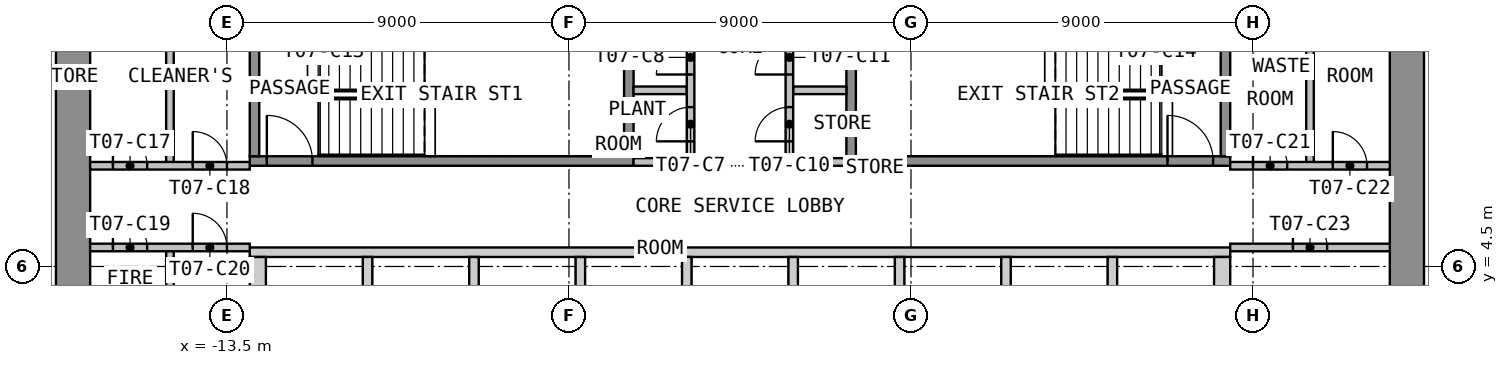
"""IFC4 building model, lengths in metres.
Left out: names, types, materials, properties, quantities, classifications, styles, units other than length and angle.
Written with IfcOpenShell. Run it as: python <this file> out.ifc"""

import sys

from ifc_helpers import new_model, si_unit, direction, frame, frame_2d, origin, place, context, subcontext, project, spatial, polyline, rectangle, outline, extrude, element, fill, save


model = new_model("IFC4")
c1 = context("Model", 3, precision=1e-05, world=origin(), true_north=direction((0.0, 1.0)))
c2 = subcontext(c1, "Body", "Model", "MODEL_VIEW")
j1 = project(units=[si_unit("LENGTHUNIT", "METRE"), si_unit("PLANEANGLEUNIT", "RADIAN")], contexts=[c1])
p1 = place(None, origin())
s1 = spatial("IfcSite", under=j1, at=p1, CompositionType="ELEMENT")
p2 = place(p1, origin())
s2 = spatial("IfcBuilding", under=s1, at=p2, CompositionType="ELEMENT")
p3 = place(p2, frame((0.0, 0.0, 104.7)))
s3 = spatial("IfcBuildingStorey", under=s2, at=p3, CompositionType="ELEMENT", Elevation=104.7)
p4 = place(p3, frame((-17.55, -12.6, 0.0), z_axis=(0.0, 0.0, 1.0), x_axis=(0.0, 1.0, 0.0)))
e1 = element("IfcWall", 1, at=p4, inside=s3, PredefinedType="SHEAR", context=c2, shape_type="SweptSolid", body=[
    extrude(rectangle(XDim=25.2, YDim=0.9, at=frame_2d((12.6, 0.0))), origin(), (0.0, 0.0, 1.0), 3.525),
])
p5 = place(p4, frame((11.4, 0.0, 0.0)))
e2 = element("IfcOpeningElement", 2, at=p5, cuts=e1, PredefinedType="OPENING", context=c2, shape_type="SweptSolid", body=[
    extrude(rectangle(XDim=2.4, YDim=2.1, at=frame_2d((1.2, 1.05))), frame((0.0, 0.46, 0.0), z_axis=(0.0, -1.0, 0.0), x_axis=(1.0, 0.0, 0.0)), (0.0, 0.0, 1.0), 0.92),
])
p6 = place(p3, frame((17.55, -12.6, 0.0), z_axis=(0.0, 0.0, 1.0), x_axis=(0.0, 1.0, 0.0)))
e3 = element("IfcWall", 3, at=p6, inside=s3, PredefinedType="SHEAR", context=c2, shape_type="SweptSolid", body=[
    extrude(rectangle(XDim=25.2, YDim=0.9, at=frame_2d((12.6, 0.0))), origin(), (0.0, 0.0, 1.0), 3.525),
])
p7 = place(p6, frame((11.4, 0.0, 0.0)))
e4 = element("IfcOpeningElement", 4, at=p7, cuts=e3, PredefinedType="OPENING", context=c2, shape_type="SweptSolid", body=[
    extrude(rectangle(XDim=2.4, YDim=2.1, at=frame_2d((1.2, 1.05))), frame((0.0, 0.46, 0.0), z_axis=(0.0, -1.0, 0.0), x_axis=(1.0, 0.0, 0.0)), (0.0, 0.0, 1.0), 0.92),
])
p8 = place(p3, origin())
e5 = element("IfcWall", 5, at=p8, inside=s3, PredefinedType="SHEAR", context=c2, shape_type="SweptSolid", body=[
    extrude(outline(polyline([(-12.9, 4.75), (12.9, 4.75), (12.9, 5.0), (-12.9, 5.0), (-12.9, 4.75)])), origin(), (0.0, 0.0, 1.0), 3.525),
])
p9 = place(p3, origin())
e6 = element("IfcWall", 6, at=p9, inside=s3, PredefinedType="SHEAR", context=c2, shape_type="SweptSolid", body=[
    extrude(outline(polyline([(-12.9, 2.05), (-12.475, 2.05), (-12.475, 4.75), (-12.9, 4.75), (-12.9, 2.05)])), origin(), (0.0, 0.0, 1.0), 3.525),
])
p10 = place(p3, origin())
e7 = element("IfcWall", 7, at=p10, inside=s3, PredefinedType="SHEAR", context=c2, shape_type="SweptSolid", body=[
    extrude(outline(polyline([(-9.925, 2.05), (-9.675, 2.05), (-9.675, 4.75), (-9.925, 4.75), (-9.925, 2.05)])), origin(), (0.0, 0.0, 1.0), 3.525),
])
p11 = place(p3, origin())
e8 = element("IfcWall", 8, at=p11, inside=s3, PredefinedType="SHEAR", context=c2, shape_type="SweptSolid", body=[
    extrude(outline(polyline([(-7.125, 2.05), (-6.875, 2.05), (-6.875, 4.75), (-7.125, 4.75), (-7.125, 2.05)])), origin(), (0.0, 0.0, 1.0), 3.525),
])
p12 = place(p3, origin())
e9 = element("IfcWall", 9, at=p12, inside=s3, PredefinedType="SHEAR", context=c2, shape_type="SweptSolid", body=[
    extrude(outline(polyline([(-4.325, 2.05), (-4.075, 2.05), (-4.075, 4.75), (-4.325, 4.75), (-4.325, 2.05)])), origin(), (0.0, 0.0, 1.0), 3.525),
])
p13 = place(p3, origin())
e10 = element("IfcWall", 10, at=p13, inside=s3, PredefinedType="SHEAR", context=c2, shape_type="SweptSolid", body=[
    extrude(outline(polyline([(-1.525, 2.05), (-1.275, 2.05), (-1.275, 4.75), (-1.525, 4.75), (-1.525, 2.05)])), origin(), (0.0, 0.0, 1.0), 3.525),
])
p14 = place(p3, origin())
e11 = element("IfcWall", 11, at=p14, inside=s3, PredefinedType="SHEAR", context=c2, shape_type="SweptSolid", body=[
    extrude(outline(polyline([(1.275, 2.05), (1.525, 2.05), (1.525, 4.75), (1.275, 4.75), (1.275, 2.05)])), origin(), (0.0, 0.0, 1.0), 3.525),
])
p15 = place(p3, origin())
e12 = element("IfcWall", 12, at=p15, inside=s3, PredefinedType="SHEAR", context=c2, shape_type="SweptSolid", body=[
    extrude(outline(polyline([(4.075, 2.05), (4.325, 2.05), (4.325, 4.75), (4.075, 4.75), (4.075, 2.05)])), origin(), (0.0, 0.0, 1.0), 3.525),
])
p16 = place(p3, origin())
e13 = element("IfcWall", 13, at=p16, inside=s3, PredefinedType="SHEAR", context=c2, shape_type="SweptSolid", body=[
    extrude(outline(polyline([(6.875, 2.05), (7.125, 2.05), (7.125, 4.75), (6.875, 4.75), (6.875, 2.05)])), origin(), (0.0, 0.0, 1.0), 3.525),
])
p17 = place(p3, origin())
e14 = element("IfcWall", 14, at=p17, inside=s3, PredefinedType="SHEAR", context=c2, shape_type="SweptSolid", body=[
    extrude(outline(polyline([(9.675, 2.05), (9.925, 2.05), (9.925, 4.75), (9.675, 4.75), (9.675, 2.05)])), origin(), (0.0, 0.0, 1.0), 3.525),
])
p18 = place(p3, origin())
e15 = element("IfcWall", 15, at=p18, inside=s3, PredefinedType="SHEAR", context=c2, shape_type="SweptSolid", body=[
    extrude(outline(polyline([(12.475, 2.05), (12.9, 2.05), (12.9, 4.75), (12.475, 4.75), (12.475, 2.05)])), origin(), (0.0, 0.0, 1.0), 3.525),
])
p19 = place(p3, frame((-12.9, 7.275, 0.0), z_axis=(0.0, 0.0, 1.0), x_axis=(1.0, 0.0, 0.0)))
e16 = element("IfcWall", 16, at=p19, inside=s3, PredefinedType="SHEAR", context=c2, shape_type="SweptSolid", body=[
    extrude(rectangle(XDim=10.1, YDim=0.25, at=frame_2d((5.05, 0.0))), origin(), (0.0, 0.0, 1.0), 3.525),
])
p20 = place(p19, frame((0.45, 0.0, 0.0)))
e17 = element("IfcOpeningElement", 17, at=p20, cuts=e16, PredefinedType="OPENING", context=c2, shape_type="SweptSolid", body=[
    extrude(rectangle(XDim=1.2, YDim=2.1, at=frame_2d((0.6, 1.05))), frame((0.0, 0.135, 0.0), z_axis=(0.0, -1.0, 0.0), x_axis=(1.0, 0.0, 0.0)), (0.0, 0.0, 1.0), 0.27),
])
for number, where, z_axis, x_axis in (
    (18, (-12.775, 7.4, 0.0), (0.0, 0.0, 1.0), (0.0, 1.0, 0.0)),
    (19, (-2.925, 7.4, 0.0), (0.0, 0.0, 1.0), (0.0, 1.0, 0.0)),
):
    element("IfcWall", number, at=place(p3, frame(where, z_axis=z_axis, x_axis=x_axis)), inside=s3, PredefinedType="SHEAR", context=c2, shape_type="SweptSolid", body=[
        extrude(rectangle(XDim=3.25, YDim=0.25, at=frame_2d((1.625, 0.0))), origin(), (0.0, 0.0, 1.0), 3.525),
    ])
p21 = place(p3, frame((2.8, 7.275, 0.0), z_axis=(0.0, 0.0, 1.0), x_axis=(1.0, 0.0, 0.0)))
e20 = element("IfcWall", 20, at=p21, inside=s3, PredefinedType="SHEAR", context=c2, shape_type="SweptSolid", body=[
    extrude(rectangle(XDim=10.1, YDim=0.25, at=frame_2d((5.05, 0.0))), origin(), (0.0, 0.0, 1.0), 3.525),
])
p22 = place(p21, frame((8.45, 0.0, 0.0)))
e21 = element("IfcOpeningElement", 21, at=p22, cuts=e20, PredefinedType="OPENING", context=c2, shape_type="SweptSolid", body=[
    extrude(rectangle(XDim=1.2, YDim=2.1, at=frame_2d((0.6, 1.05))), frame((0.0, 0.135, 0.0), z_axis=(0.0, -1.0, 0.0), x_axis=(1.0, 0.0, 0.0)), (0.0, 0.0, 1.0), 0.27),
])
for number, where, z_axis, x_axis in (
    (22, (2.925, 7.4, 0.0), (0.0, 0.0, 1.0), (0.0, 1.0, 0.0)),
    (23, (12.775, 7.4, 0.0), (0.0, 0.0, 1.0), (0.0, 1.0, 0.0)),
):
    element("IfcWall", number, at=place(p3, frame(where, z_axis=z_axis, x_axis=x_axis)), inside=s3, PredefinedType="SHEAR", context=c2, shape_type="SweptSolid", body=[
        extrude(rectangle(XDim=3.25, YDim=0.25, at=frame_2d((1.625, 0.0))), origin(), (0.0, 0.0, 1.0), 3.525),
    ])
for number, where, z_axis, x_axis in (
    (24, (-2.8, 7.25, 0.0), (0.0, 0.0, 1.0), (1.0, 0.0, 0.0)),
    (25, (-2.8, 9.135, 0.0), (0.0, 0.0, 1.0), (1.0, 0.0, 0.0)),
    (26, (1.4, 7.25, 0.0), (0.0, 0.0, 1.0), (1.0, 0.0, 0.0)),
    (27, (1.4, 9.135, 0.0), (0.0, 0.0, 1.0), (1.0, 0.0, 0.0)),
):
    element("IfcWall", number, at=place(p3, frame(where, z_axis=z_axis, x_axis=x_axis)), inside=s3, PredefinedType="PARTITIONING", context=c2, shape_type="SweptSolid", body=[
        extrude(rectangle(XDim=1.4, YDim=0.2, at=frame_2d((0.7, 0.0))), origin(), (0.0, 0.0, 1.0), 3.525),
    ])
p23 = place(p3, frame((-1.3, 7.15, 0.0), z_axis=(0.0, 0.0, 1.0), x_axis=(0.0, 1.0, 0.0)))
e28 = element("IfcWall", 28, at=p23, inside=s3, PredefinedType="PARTITIONING", context=c2, shape_type="SweptSolid", body=[
    extrude(rectangle(XDim=5.45, YDim=0.2, at=frame_2d((2.725, 0.0))), origin(), (0.0, 0.0, 1.0), 3.525),
])
p24 = place(p23, frame((0.643, 0.0, 0.0)))
e29 = element("IfcOpeningElement", 29, at=p24, cuts=e28, PredefinedType="OPENING", context=c2, shape_type="SweptSolid", body=[
    extrude(rectangle(XDim=0.9, YDim=2.1, at=frame_2d((0.45, 1.05))), frame((0.0, 0.11, 0.0), z_axis=(0.0, -1.0, 0.0), x_axis=(1.0, 0.0, 0.0)), (0.0, 0.0, 1.0), 0.22),
])
p25 = place(p23, frame((2.401, 0.0, 0.0)))
e30 = element("IfcOpeningElement", 30, at=p25, cuts=e28, PredefinedType="OPENING", context=c2, shape_type="SweptSolid", body=[
    extrude(rectangle(XDim=0.9, YDim=2.1, at=frame_2d((0.45, 1.05))), frame((0.0, 0.11, 0.0), z_axis=(0.0, -1.0, 0.0), x_axis=(1.0, 0.0, 0.0)), (0.0, 0.0, 1.0), 0.22),
])
p26 = place(p23, frame((4.134, 0.0, 0.0)))
e31 = element("IfcOpeningElement", 31, at=p26, cuts=e28, PredefinedType="OPENING", context=c2, shape_type="SweptSolid", body=[
    extrude(rectangle(XDim=0.9, YDim=2.1, at=frame_2d((0.45, 1.05))), frame((0.0, 0.11, 0.0), z_axis=(0.0, -1.0, 0.0), x_axis=(1.0, 0.0, 0.0)), (0.0, 0.0, 1.0), 0.22),
])
p27 = place(p3, frame((1.3, 7.15, 0.0), z_axis=(0.0, 0.0, 1.0), x_axis=(0.0, 1.0, 0.0)))
e32 = element("IfcWall", 32, at=p27, inside=s3, PredefinedType="PARTITIONING", context=c2, shape_type="SweptSolid", body=[
    extrude(rectangle(XDim=5.45, YDim=0.2, at=frame_2d((2.725, 0.0))), origin(), (0.0, 0.0, 1.0), 3.525),
])
p28 = place(p27, frame((0.643, 0.0, 0.0)))
e33 = element("IfcOpeningElement", 33, at=p28, cuts=e32, PredefinedType="OPENING", context=c2, shape_type="SweptSolid", body=[
    extrude(rectangle(XDim=0.9, YDim=2.1, at=frame_2d((0.45, 1.05))), frame((0.0, 0.11, 0.0), z_axis=(0.0, -1.0, 0.0), x_axis=(1.0, 0.0, 0.0)), (0.0, 0.0, 1.0), 0.22),
])
p29 = place(p27, frame((2.401, 0.0, 0.0)))
e34 = element("IfcOpeningElement", 34, at=p29, cuts=e32, PredefinedType="OPENING", context=c2, shape_type="SweptSolid", body=[
    extrude(rectangle(XDim=0.9, YDim=2.1, at=frame_2d((0.45, 1.05))), frame((0.0, 0.11, 0.0), z_axis=(0.0, -1.0, 0.0), x_axis=(1.0, 0.0, 0.0)), (0.0, 0.0, 1.0), 0.22),
])
p30 = place(p27, frame((4.134, 0.0, 0.0)))
e35 = element("IfcOpeningElement", 35, at=p30, cuts=e32, PredefinedType="OPENING", context=c2, shape_type="SweptSolid", body=[
    extrude(rectangle(XDim=0.9, YDim=2.1, at=frame_2d((0.45, 1.05))), frame((0.0, 0.11, 0.0), z_axis=(0.0, -1.0, 0.0), x_axis=(1.0, 0.0, 0.0)), (0.0, 0.0, 1.0), 0.22),
])
p31 = place(p3, frame((-15.0, 7.15, 0.0), z_axis=(0.0, 0.0, 1.0), x_axis=(0.0, 1.0, 0.0)))
e36 = element("IfcWall", 36, at=p31, inside=s3, PredefinedType="PARTITIONING", context=c2, shape_type="SweptSolid", body=[
    extrude(rectangle(XDim=5.45, YDim=0.2, at=frame_2d((2.725, 0.0))), origin(), (0.0, 0.0, 1.0), 3.525),
])
p32 = place(p3, frame((-17.1, 7.15, 0.0), z_axis=(0.0, 0.0, 1.0), x_axis=(1.0, 0.0, 0.0)))
e37 = element("IfcWall", 37, at=p32, inside=s3, PredefinedType="PARTITIONING", context=c2, shape_type="SweptSolid", body=[
    extrude(rectangle(XDim=4.2, YDim=0.2, at=frame_2d((2.1, 0.0))), origin(), (0.0, 0.0, 1.0), 3.525),
])
p33 = place(p32, frame((0.6, 0.0, 0.0)))
e38 = element("IfcOpeningElement", 38, at=p33, cuts=e37, PredefinedType="OPENING", context=c2, shape_type="SweptSolid", body=[
    extrude(rectangle(XDim=0.9, YDim=2.1, at=frame_2d((0.45, 1.05))), frame((0.0, 0.11, 0.0), z_axis=(0.0, -1.0, 0.0), x_axis=(1.0, 0.0, 0.0)), (0.0, 0.0, 1.0), 0.22),
])
p34 = place(p32, frame((2.7, 0.0, 0.0)))
e39 = element("IfcOpeningElement", 39, at=p34, cuts=e37, PredefinedType="OPENING", context=c2, shape_type="SweptSolid", body=[
    extrude(rectangle(XDim=0.9, YDim=2.1, at=frame_2d((0.45, 1.05))), frame((0.0, 0.11, 0.0), z_axis=(0.0, -1.0, 0.0), x_axis=(1.0, 0.0, 0.0)), (0.0, 0.0, 1.0), 0.22),
])
p35 = place(p3, frame((-15.0, 1.8, 0.0), z_axis=(0.0, 0.0, 1.0), x_axis=(0.0, 1.0, 0.0)))
e40 = element("IfcWall", 40, at=p35, inside=s3, PredefinedType="PARTITIONING", context=c2, shape_type="SweptSolid", body=[
    extrude(rectangle(XDim=3.2, YDim=0.2, at=frame_2d((1.6, 0.0))), origin(), (0.0, 0.0, 1.0), 3.525),
])
p36 = place(p3, frame((-17.1, 5.0, 0.0), z_axis=(0.0, 0.0, 1.0), x_axis=(1.0, 0.0, 0.0)))
e41 = element("IfcWall", 41, at=p36, inside=s3, PredefinedType="PARTITIONING", context=c2, shape_type="SweptSolid", body=[
    extrude(rectangle(XDim=4.2, YDim=0.2, at=frame_2d((2.1, 0.0))), origin(), (0.0, 0.0, 1.0), 3.525),
])
p37 = place(p36, frame((0.6, 0.0, 0.0)))
e42 = element("IfcOpeningElement", 42, at=p37, cuts=e41, PredefinedType="OPENING", context=c2, shape_type="SweptSolid", body=[
    extrude(rectangle(XDim=0.9, YDim=2.1, at=frame_2d((0.45, 1.05))), frame((0.0, 0.11, 0.0), z_axis=(0.0, -1.0, 0.0), x_axis=(1.0, 0.0, 0.0)), (0.0, 0.0, 1.0), 0.22),
])
p38 = place(p36, frame((2.7, 0.0, 0.0)))
e43 = element("IfcOpeningElement", 43, at=p38, cuts=e41, PredefinedType="OPENING", context=c2, shape_type="SweptSolid", body=[
    extrude(rectangle(XDim=0.9, YDim=2.1, at=frame_2d((0.45, 1.05))), frame((0.0, 0.11, 0.0), z_axis=(0.0, -1.0, 0.0), x_axis=(1.0, 0.0, 0.0)), (0.0, 0.0, 1.0), 0.22),
])
p39 = place(p3, frame((15.0, 7.15, 0.0), z_axis=(0.0, 0.0, 1.0), x_axis=(0.0, 1.0, 0.0)))
e44 = element("IfcWall", 44, at=p39, inside=s3, PredefinedType="PARTITIONING", context=c2, shape_type="SweptSolid", body=[
    extrude(rectangle(XDim=5.45, YDim=0.2, at=frame_2d((2.725, 0.0))), origin(), (0.0, 0.0, 1.0), 3.525),
])
p40 = place(p3, frame((12.9, 7.15, 0.0), z_axis=(0.0, 0.0, 1.0), x_axis=(1.0, 0.0, 0.0)))
e45 = element("IfcWall", 45, at=p40, inside=s3, PredefinedType="PARTITIONING", context=c2, shape_type="SweptSolid", body=[
    extrude(rectangle(XDim=4.2, YDim=0.2, at=frame_2d((2.1, 0.0))), origin(), (0.0, 0.0, 1.0), 3.525),
])
p41 = place(p40, frame((0.6, 0.0, 0.0)))
e46 = element("IfcOpeningElement", 46, at=p41, cuts=e45, PredefinedType="OPENING", context=c2, shape_type="SweptSolid", body=[
    extrude(rectangle(XDim=0.9, YDim=2.1, at=frame_2d((0.45, 1.05))), frame((0.0, 0.11, 0.0), z_axis=(0.0, -1.0, 0.0), x_axis=(1.0, 0.0, 0.0)), (0.0, 0.0, 1.0), 0.22),
])
p42 = place(p40, frame((2.7, 0.0, 0.0)))
e47 = element("IfcOpeningElement", 47, at=p42, cuts=e45, PredefinedType="OPENING", context=c2, shape_type="SweptSolid", body=[
    extrude(rectangle(XDim=0.9, YDim=2.1, at=frame_2d((0.45, 1.05))), frame((0.0, 0.11, 0.0), z_axis=(0.0, -1.0, 0.0), x_axis=(1.0, 0.0, 0.0)), (0.0, 0.0, 1.0), 0.22),
])
p43 = place(p3, frame((12.9, 5.0, 0.0), z_axis=(0.0, 0.0, 1.0), x_axis=(1.0, 0.0, 0.0)))
e48 = element("IfcWall", 48, at=p43, inside=s3, PredefinedType="PARTITIONING", context=c2, shape_type="SweptSolid", body=[
    extrude(rectangle(XDim=4.2, YDim=0.2, at=frame_2d((2.1, 0.0))), origin(), (0.0, 0.0, 1.0), 3.525),
])
p44 = place(p43, frame((1.65, 0.0, 0.0)))
e49 = element("IfcOpeningElement", 49, at=p44, cuts=e48, PredefinedType="OPENING", context=c2, shape_type="SweptSolid", body=[
    extrude(rectangle(XDim=0.9, YDim=2.1, at=frame_2d((0.45, 1.05))), frame((0.0, 0.11, 0.0), z_axis=(0.0, -1.0, 0.0), x_axis=(1.0, 0.0, 0.0)), (0.0, 0.0, 1.0), 0.22),
])
p45 = place(p20, origin())
e50 = element("IfcDoor", 50, at=p45, inside=s3, OperationType="SINGLE_SWING_LEFT", PredefinedType="DOOR", context=c2, shape_type="SweptSolid", body=[
    extrude(rectangle(XDim=1.2, YDim=2.1, at=frame_2d((0.6, 1.05))), frame((0.0, 0.025, 0.0), z_axis=(0.0, -1.0, 0.0), x_axis=(1.0, 0.0, 0.0)), (0.0, 0.0, 1.0), 0.05),
])
fill(e17, e50)
p46 = place(p22, origin())
e51 = element("IfcDoor", 51, at=p46, inside=s3, OperationType="SINGLE_SWING_LEFT", PredefinedType="DOOR", context=c2, shape_type="SweptSolid", body=[
    extrude(rectangle(XDim=1.2, YDim=2.1, at=frame_2d((0.6, 1.05))), frame((0.0, 0.025, 0.0), z_axis=(0.0, -1.0, 0.0), x_axis=(1.0, 0.0, 0.0)), (0.0, 0.0, 1.0), 0.05),
])
fill(e21, e51)
p47 = place(p24, origin())
e52 = element("IfcDoor", 52, at=p47, inside=s3, OperationType="SINGLE_SWING_LEFT", PredefinedType="DOOR", context=c2, shape_type="SweptSolid", body=[
    extrude(rectangle(XDim=0.9, YDim=2.1, at=frame_2d((0.45, 1.05))), frame((0.0, 0.025, 0.0), z_axis=(0.0, -1.0, 0.0), x_axis=(1.0, 0.0, 0.0)), (0.0, 0.0, 1.0), 0.05),
])
fill(e29, e52)
p48 = place(p25, origin())
e53 = element("IfcDoor", 53, at=p48, inside=s3, OperationType="SINGLE_SWING_LEFT", PredefinedType="DOOR", context=c2, shape_type="SweptSolid", body=[
    extrude(rectangle(XDim=0.9, YDim=2.1, at=frame_2d((0.45, 1.05))), frame((0.0, 0.025, 0.0), z_axis=(0.0, -1.0, 0.0), x_axis=(1.0, 0.0, 0.0)), (0.0, 0.0, 1.0), 0.05),
])
fill(e30, e53)
p49 = place(p28, origin())
e54 = element("IfcDoor", 54, at=p49, inside=s3, OperationType="SINGLE_SWING_LEFT", PredefinedType="DOOR", context=c2, shape_type="SweptSolid", body=[
    extrude(rectangle(XDim=0.9, YDim=2.1, at=frame_2d((0.45, 1.05))), frame((0.0, 0.025, 0.0), z_axis=(0.0, -1.0, 0.0), x_axis=(1.0, 0.0, 0.0)), (0.0, 0.0, 1.0), 0.05),
])
fill(e33, e54)
p50 = place(p29, origin())
e55 = element("IfcDoor", 55, at=p50, inside=s3, OperationType="SINGLE_SWING_LEFT", PredefinedType="DOOR", context=c2, shape_type="SweptSolid", body=[
    extrude(rectangle(XDim=0.9, YDim=2.1, at=frame_2d((0.45, 1.05))), frame((0.0, 0.025, 0.0), z_axis=(0.0, -1.0, 0.0), x_axis=(1.0, 0.0, 0.0)), (0.0, 0.0, 1.0), 0.05),
])
fill(e34, e55)
p51 = place(p33, origin())
e56 = element("IfcDoor", 56, at=p51, inside=s3, OperationType="SINGLE_SWING_LEFT", PredefinedType="DOOR", context=c2, shape_type="SweptSolid", body=[
    extrude(rectangle(XDim=0.9, YDim=2.1, at=frame_2d((0.45, 1.05))), frame((0.0, 0.025, 0.0), z_axis=(0.0, -1.0, 0.0), x_axis=(1.0, 0.0, 0.0)), (0.0, 0.0, 1.0), 0.05),
])
fill(e38, e56)
p52 = place(p34, origin())
e57 = element("IfcDoor", 57, at=p52, inside=s3, OperationType="SINGLE_SWING_LEFT", PredefinedType="DOOR", context=c2, shape_type="SweptSolid", body=[
    extrude(rectangle(XDim=0.9, YDim=2.1, at=frame_2d((0.45, 1.05))), frame((0.0, 0.025, 0.0), z_axis=(0.0, -1.0, 0.0), x_axis=(1.0, 0.0, 0.0)), (0.0, 0.0, 1.0), 0.05),
])
fill(e39, e57)
p53 = place(p37, origin())
e58 = element("IfcDoor", 58, at=p53, inside=s3, OperationType="SINGLE_SWING_LEFT", PredefinedType="DOOR", context=c2, shape_type="SweptSolid", body=[
    extrude(rectangle(XDim=0.9, YDim=2.1, at=frame_2d((0.45, 1.05))), frame((0.0, 0.025, 0.0), z_axis=(0.0, -1.0, 0.0), x_axis=(1.0, 0.0, 0.0)), (0.0, 0.0, 1.0), 0.05),
])
fill(e42, e58)
p54 = place(p38, origin())
e59 = element("IfcDoor", 59, at=p54, inside=s3, OperationType="SINGLE_SWING_LEFT", PredefinedType="DOOR", context=c2, shape_type="SweptSolid", body=[
    extrude(rectangle(XDim=0.9, YDim=2.1, at=frame_2d((0.45, 1.05))), frame((0.0, 0.025, 0.0), z_axis=(0.0, -1.0, 0.0), x_axis=(1.0, 0.0, 0.0)), (0.0, 0.0, 1.0), 0.05),
])
fill(e43, e59)
p55 = place(p41, origin())
e60 = element("IfcDoor", 60, at=p55, inside=s3, OperationType="SINGLE_SWING_LEFT", PredefinedType="DOOR", context=c2, shape_type="SweptSolid", body=[
    extrude(rectangle(XDim=0.9, YDim=2.1, at=frame_2d((0.45, 1.05))), frame((0.0, 0.025, 0.0), z_axis=(0.0, -1.0, 0.0), x_axis=(1.0, 0.0, 0.0)), (0.0, 0.0, 1.0), 0.05),
])
fill(e46, e60)
p56 = place(p42, origin())
e61 = element("IfcDoor", 61, at=p56, inside=s3, OperationType="SINGLE_SWING_LEFT", PredefinedType="DOOR", context=c2, shape_type="SweptSolid", body=[
    extrude(rectangle(XDim=0.9, YDim=2.1, at=frame_2d((0.45, 1.05))), frame((0.0, 0.025, 0.0), z_axis=(0.0, -1.0, 0.0), x_axis=(1.0, 0.0, 0.0)), (0.0, 0.0, 1.0), 0.05),
])
fill(e47, e61)
p57 = place(p44, origin())
e62 = element("IfcDoor", 62, at=p57, inside=s3, OperationType="SINGLE_SWING_LEFT", PredefinedType="DOOR", context=c2, shape_type="SweptSolid", body=[
    extrude(rectangle(XDim=0.9, YDim=2.1, at=frame_2d((0.45, 1.05))), frame((0.0, 0.025, 0.0), z_axis=(0.0, -1.0, 0.0), x_axis=(1.0, 0.0, 0.0)), (0.0, 0.0, 1.0), 0.05),
])
fill(e49, e62)
save(model, sys.argv[1])
